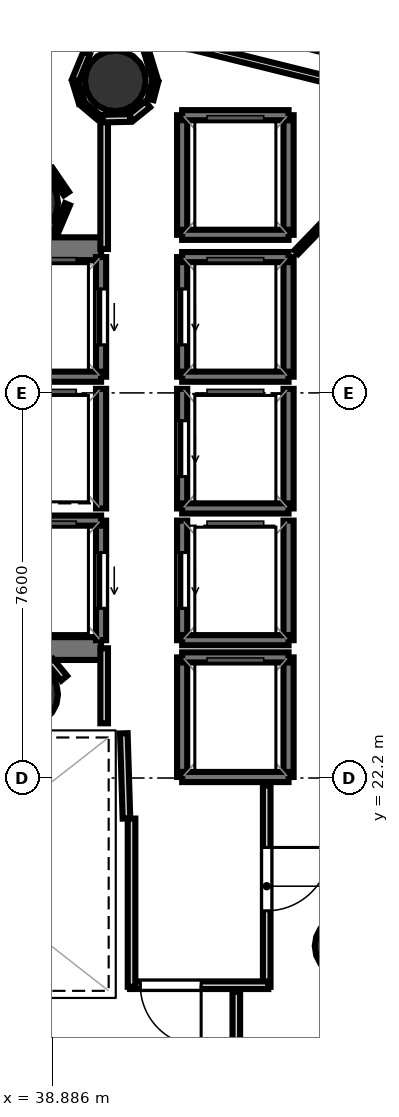
"""IFC4 building model, lengths in metres.
Left out: names, types, materials, properties, quantities, classifications, styles, units other than length and angle.
Written with IfcOpenShell. Run it as: python <this file> out.ifc"""

import sys

from ifc_helpers import new_model, si_unit, direction, frame, frame_2d, origin, origin_2d, place, context, subcontext, project, spatial, rectangle, hollow_circle, extrude, element, fill, save


model = new_model("IFC4")
c1 = context("Model", 3, precision=1e-05, world=origin(), true_north=direction((0.0, 1.0)))
c2 = subcontext(c1, "Body", "Model", "MODEL_VIEW")
j1 = project(units=[si_unit("LENGTHUNIT", "METRE"), si_unit("PLANEANGLEUNIT", "RADIAN")], contexts=[c1])
p1 = place(None, origin())
s1 = spatial("IfcSite", under=j1, at=p1, CompositionType="ELEMENT")
p2 = place(p1, origin())
s2 = spatial("IfcBuilding", under=s1, at=p2, CompositionType="ELEMENT")
p3 = place(p2, frame((0.0, 0.0, 192.9)))
s3 = spatial("IfcBuildingStorey", under=s2, at=p3, CompositionType="ELEMENT", Elevation=192.9)
p4 = place(p3, frame((29.33, 32.645, 0.0), z_axis=(0.0, 0.0, 1.0), x_axis=(1.0, 0.0, 0.0)))
e1 = element("IfcWall", 1, at=p4, inside=s3, PredefinedType="SHEAR", context=c2, shape_type="SweptSolid", body=[
    extrude(rectangle(XDim=10.52, YDim=0.45, at=frame_2d((5.26, 0.0))), origin(), (0.0, 0.0, 1.0), 3.52),
])
p5 = place(p4, frame((0.895, 0.0, 0.0)))
e2 = element("IfcOpeningElement", 2, at=p5, cuts=e1, PredefinedType="OPENING", context=c2, shape_type="SweptSolid", body=[
    extrude(rectangle(XDim=1.25, YDim=2.15, at=frame_2d((0.625, 1.075))), frame((0.0, 0.235, 0.0), z_axis=(0.0, -1.0, 0.0), x_axis=(1.0, 0.0, 0.0)), (0.0, 0.0, 1.0), 0.47),
])
p6 = place(p3, frame((29.33, 24.755, 0.0), z_axis=(0.0, 0.0, 1.0), x_axis=(1.0, 0.0, 0.0)))
e3 = element("IfcWall", 3, at=p6, inside=s3, PredefinedType="SHEAR", context=c2, shape_type="SweptSolid", body=[
    extrude(rectangle(XDim=10.52, YDim=0.45, at=frame_2d((5.26, 0.0))), origin(), (0.0, 0.0, 1.0), 3.52),
])
p7 = place(p6, frame((0.695, 0.0, 0.0)))
e4 = element("IfcOpeningElement", 4, at=p7, cuts=e3, PredefinedType="OPENING", context=c2, shape_type="SweptSolid", body=[
    extrude(rectangle(XDim=1.25, YDim=2.15, at=frame_2d((0.625, 1.075))), frame((0.0, 0.235, 0.0), z_axis=(0.0, -1.0, 0.0), x_axis=(1.0, 0.0, 0.0)), (0.0, 0.0, 1.0), 0.47),
])
for number, where, z_axis, x_axis in (
    (5, (38.4, 33.55, 0.0), (0.0, 0.0, 1.0), (1.0, 0.0, 0.0)),
    (6, (38.4, 23.85, 0.0), (0.0, 0.0, 1.0), (1.0, 0.0, 0.0)),
    (7, (40.131, 35.958, 0.0), (0.0, 0.0, 1.0), (1.0, 0.0, 0.0)),
    (8, (44.667, 18.883, 0.0), (0.0, 0.0, 1.0), (1.0, 0.0, 0.0)),
):
    element("IfcColumn", number, at=place(p3, frame(where, z_axis=z_axis, x_axis=x_axis)), inside=s3, PredefinedType="COLUMN", context=c2, shape_type="SweptSolid", body=[
        extrude(hollow_circle(Radius=0.6, WallThickness=0.03, at=origin_2d()), origin(), (0.0, 0.0, 1.0), 3.7),
    ])
p8 = place(p3, frame((39.85, 30.12, 0.0), z_axis=(0.0, 0.0, 1.0), x_axis=(0.0, 1.0, 0.0)))
e9 = element("IfcWall", 9, at=p8, inside=s3, PredefinedType="SOLIDWALL", context=c2, shape_type="SweptSolid", body=[
    extrude(rectangle(XDim=2.36, YDim=0.2, at=frame_2d((1.18, 0.0))), origin(), (0.0, 0.0, 1.0), 3.52),
])
p9 = place(p8, frame((0.63, 0.0, 0.0)))
e10 = element("IfcOpeningElement", 10, at=p9, cuts=e9, PredefinedType="OPENING", context=c2, shape_type="SweptSolid", body=[
    extrude(rectangle(XDim=1.1, YDim=2.15, at=frame_2d((0.55, 1.075))), frame((0.0, 0.11, 0.0), z_axis=(0.0, -1.0, 0.0), x_axis=(1.0, 0.0, 0.0)), (0.0, 0.0, 1.0), 0.22),
])
p10 = place(p3, frame((37.75, 30.12, 0.0), z_axis=(0.0, 0.0, 1.0), x_axis=(1.0, 0.0, 0.0)))
e11 = element("IfcWall", 11, at=p10, inside=s3, PredefinedType="SOLIDWALL", context=c2, shape_type="SweptSolid", body=[
    extrude(rectangle(XDim=2.1, YDim=0.2, at=frame_2d((1.05, 0.0))), origin(), (0.0, 0.0, 1.0), 3.52),
])
p11 = place(p3, frame((39.85, 24.92, 0.0), z_axis=(0.0, 0.0, 1.0), x_axis=(0.0, 1.0, 0.0)))
e12 = element("IfcWall", 12, at=p11, inside=s3, PredefinedType="SOLIDWALL", context=c2, shape_type="SweptSolid", body=[
    extrude(rectangle(XDim=2.36, YDim=0.2, at=frame_2d((1.18, 0.0))), origin(), (0.0, 0.0, 1.0), 3.52),
])
p12 = place(p11, frame((0.63, 0.0, 0.0)))
e13 = element("IfcOpeningElement", 13, at=p12, cuts=e12, PredefinedType="OPENING", context=c2, shape_type="SweptSolid", body=[
    extrude(rectangle(XDim=1.1, YDim=2.15, at=frame_2d((0.55, 1.075))), frame((0.0, 0.11, 0.0), z_axis=(0.0, -1.0, 0.0), x_axis=(1.0, 0.0, 0.0)), (0.0, 0.0, 1.0), 0.22),
])
p13 = place(p3, frame((37.75, 27.28, 0.0), z_axis=(0.0, 0.0, 1.0), x_axis=(1.0, 0.0, 0.0)))
e14 = element("IfcWall", 14, at=p13, inside=s3, PredefinedType="SOLIDWALL", context=c2, shape_type="SweptSolid", body=[
    extrude(rectangle(XDim=2.1, YDim=0.2, at=frame_2d((1.05, 0.0))), origin(), (0.0, 0.0, 1.0), 3.52),
])
p14 = place(p3, frame((43.55, 30.12, 0.0), z_axis=(0.0, 0.0, 1.0), x_axis=(0.0, 1.0, 0.0)))
e15 = element("IfcWall", 15, at=p14, inside=s3, PredefinedType="SOLIDWALL", context=c2, shape_type="SweptSolid", body=[
    extrude(rectangle(XDim=2.36, YDim=0.2, at=frame_2d((1.18, 0.0))), origin(), (0.0, 0.0, 1.0), 3.52),
])
p15 = place(p3, frame((41.45, 30.12, 0.0), z_axis=(0.0, 0.0, 1.0), x_axis=(0.0, 1.0, 0.0)))
e16 = element("IfcWall", 16, at=p15, inside=s3, PredefinedType="SOLIDWALL", context=c2, shape_type="SweptSolid", body=[
    extrude(rectangle(XDim=2.36, YDim=0.2, at=frame_2d((1.18, 0.0))), origin(), (0.0, 0.0, 1.0), 3.52),
])
p16 = place(p15, frame((0.63, 0.0, 0.0)))
e17 = element("IfcOpeningElement", 17, at=p16, cuts=e16, PredefinedType="OPENING", context=c2, shape_type="SweptSolid", body=[
    extrude(rectangle(XDim=1.1, YDim=2.15, at=frame_2d((0.55, 1.075))), frame((0.0, 0.11, 0.0), z_axis=(0.0, -1.0, 0.0), x_axis=(1.0, 0.0, 0.0)), (0.0, 0.0, 1.0), 0.22),
])
for number, where, z_axis, x_axis in (
    (18, (41.45, 32.48, 0.0), (0.0, 0.0, 1.0), (1.0, 0.0, 0.0)),
    (19, (41.45, 30.12, 0.0), (0.0, 0.0, 1.0), (1.0, 0.0, 0.0)),
):
    element("IfcWall", number, at=place(p3, frame(where, z_axis=z_axis, x_axis=x_axis)), inside=s3, PredefinedType="SOLIDWALL", context=c2, shape_type="SweptSolid", body=[
        extrude(rectangle(XDim=2.1, YDim=0.2, at=frame_2d((1.05, 0.0))), origin(), (0.0, 0.0, 1.0), 3.52),
    ])
p17 = place(p3, frame((43.55, 27.52, 0.0), z_axis=(0.0, 0.0, 1.0), x_axis=(0.0, 1.0, 0.0)))
e20 = element("IfcWall", 20, at=p17, inside=s3, PredefinedType="SOLIDWALL", context=c2, shape_type="SweptSolid", body=[
    extrude(rectangle(XDim=2.36, YDim=0.2, at=frame_2d((1.18, 0.0))), origin(), (0.0, 0.0, 1.0), 3.52),
])
p18 = place(p3, frame((41.45, 27.52, 0.0), z_axis=(0.0, 0.0, 1.0), x_axis=(0.0, 1.0, 0.0)))
e21 = element("IfcWall", 21, at=p18, inside=s3, PredefinedType="SOLIDWALL", context=c2, shape_type="SweptSolid", body=[
    extrude(rectangle(XDim=2.36, YDim=0.2, at=frame_2d((1.18, 0.0))), origin(), (0.0, 0.0, 1.0), 3.52),
])
p19 = place(p18, frame((0.63, 0.0, 0.0)))
e22 = element("IfcOpeningElement", 22, at=p19, cuts=e21, PredefinedType="OPENING", context=c2, shape_type="SweptSolid", body=[
    extrude(rectangle(XDim=1.1, YDim=2.15, at=frame_2d((0.55, 1.075))), frame((0.0, 0.11, 0.0), z_axis=(0.0, -1.0, 0.0), x_axis=(1.0, 0.0, 0.0)), (0.0, 0.0, 1.0), 0.22),
])
p20 = place(p3, frame((41.45, 27.52, 0.0), z_axis=(0.0, 0.0, 1.0), x_axis=(1.0, 0.0, 0.0)))
e23 = element("IfcWall", 23, at=p20, inside=s3, PredefinedType="SOLIDWALL", context=c2, shape_type="SweptSolid", body=[
    extrude(rectangle(XDim=2.1, YDim=0.2, at=frame_2d((1.05, 0.0))), origin(), (0.0, 0.0, 1.0), 3.52),
])
p21 = place(p3, frame((43.55, 24.92, 0.0), z_axis=(0.0, 0.0, 1.0), x_axis=(0.0, 1.0, 0.0)))
e24 = element("IfcWall", 24, at=p21, inside=s3, PredefinedType="SOLIDWALL", context=c2, shape_type="SweptSolid", body=[
    extrude(rectangle(XDim=2.36, YDim=0.2, at=frame_2d((1.18, 0.0))), origin(), (0.0, 0.0, 1.0), 3.52),
])
p22 = place(p3, frame((41.45, 24.92, 0.0), z_axis=(0.0, 0.0, 1.0), x_axis=(0.0, 1.0, 0.0)))
e25 = element("IfcWall", 25, at=p22, inside=s3, PredefinedType="SOLIDWALL", context=c2, shape_type="SweptSolid", body=[
    extrude(rectangle(XDim=2.36, YDim=0.2, at=frame_2d((1.18, 0.0))), origin(), (0.0, 0.0, 1.0), 3.52),
])
p23 = place(p22, frame((0.63, 0.0, 0.0)))
e26 = element("IfcOpeningElement", 26, at=p23, cuts=e25, PredefinedType="OPENING", context=c2, shape_type="SweptSolid", body=[
    extrude(rectangle(XDim=1.1, YDim=2.15, at=frame_2d((0.55, 1.075))), frame((0.0, 0.11, 0.0), z_axis=(0.0, -1.0, 0.0), x_axis=(1.0, 0.0, 0.0)), (0.0, 0.0, 1.0), 0.22),
])
p24 = place(p3, frame((41.45, 24.92, 0.0), z_axis=(0.0, 0.0, 1.0), x_axis=(1.0, 0.0, 0.0)))
e27 = element("IfcWall", 27, at=p24, inside=s3, PredefinedType="SOLIDWALL", context=c2, shape_type="SweptSolid", body=[
    extrude(rectangle(XDim=2.1, YDim=0.2, at=frame_2d((1.05, 0.0))), origin(), (0.0, 0.0, 1.0), 3.52),
])
p25 = place(p3, frame((39.85, 27.52, 0.0), z_axis=(0.0, 0.0, 1.0), x_axis=(0.0, 1.0, 0.0)))
e28 = element("IfcWall", 28, at=p25, inside=s3, PredefinedType="SOLIDWALL", context=c2, shape_type="SweptSolid", body=[
    extrude(rectangle(XDim=2.36, YDim=0.2, at=frame_2d((1.18, 0.0))), origin(), (0.0, 0.0, 1.0), 3.52),
])
for number, where, z_axis, x_axis in (
    (29, (43.55, 22.22, 0.0), (0.0, 0.0, 1.0), (0.0, 1.0, 0.0)),
    (30, (41.45, 22.22, 0.0), (0.0, 0.0, 1.0), (0.0, 1.0, 0.0)),
):
    element("IfcWall", number, at=place(p3, frame(where, z_axis=z_axis, x_axis=x_axis)), inside=s3, PredefinedType="SOLIDWALL", context=c2, shape_type="SweptSolid", body=[
        extrude(rectangle(XDim=2.36, YDim=0.2, at=frame_2d((1.18, 0.0))), origin(), (0.0, 0.0, 1.0), 3.52),
    ])
for number, where, z_axis, x_axis in (
    (31, (41.45, 24.58, 0.0), (0.0, 0.0, 1.0), (1.0, 0.0, 0.0)),
    (32, (41.45, 22.22, 0.0), (0.0, 0.0, 1.0), (1.0, 0.0, 0.0)),
):
    element("IfcWall", number, at=place(p3, frame(where, z_axis=z_axis, x_axis=x_axis)), inside=s3, PredefinedType="SOLIDWALL", context=c2, shape_type="SweptSolid", body=[
        extrude(rectangle(XDim=2.1, YDim=0.2, at=frame_2d((1.05, 0.0))), origin(), (0.0, 0.0, 1.0), 3.52),
    ])
for number, where, z_axis, x_axis in (
    (33, (43.55, 32.92, 0.0), (0.0, 0.0, 1.0), (0.0, 1.0, 0.0)),
    (34, (41.45, 32.92, 0.0), (0.0, 0.0, 1.0), (0.0, 1.0, 0.0)),
):
    element("IfcWall", number, at=place(p3, frame(where, z_axis=z_axis, x_axis=x_axis)), inside=s3, PredefinedType="SOLIDWALL", context=c2, shape_type="SweptSolid", body=[
        extrude(rectangle(XDim=2.36, YDim=0.2, at=frame_2d((1.18, 0.0))), origin(), (0.0, 0.0, 1.0), 3.52),
    ])
for number, where, z_axis, x_axis in (
    (35, (41.45, 35.28, 0.0), (0.0, 0.0, 1.0), (1.0, 0.0, 0.0)),
    (36, (41.45, 32.92, 0.0), (0.0, 0.0, 1.0), (1.0, 0.0, 0.0)),
):
    element("IfcWall", number, at=place(p3, frame(where, z_axis=z_axis, x_axis=x_axis)), inside=s3, PredefinedType="SOLIDWALL", context=c2, shape_type="SweptSolid", body=[
        extrude(rectangle(XDim=2.1, YDim=0.2, at=frame_2d((1.05, 0.0))), origin(), (0.0, 0.0, 1.0), 3.52),
    ])
p26 = place(p3, frame((40.351, 21.401, 0.0), z_axis=(0.0, 0.0, 1.0), x_axis=(-0.031058045979, 0.999517582527, 0.0)))
e37 = element("IfcWall", 37, at=p26, inside=s3, PredefinedType="PARTITIONING", context=c2, shape_type="SweptSolid", body=[
    extrude(rectangle(XDim=1.682, YDim=0.15, at=frame_2d((0.841, 0.0))), origin(), (0.0, 0.0, 1.0), 2.84),
])
p27 = place(p3, frame((39.911, 23.28, 0.0), z_axis=(0.0, 0.0, 1.0), x_axis=(0.0, 1.0, 0.0)))
e38 = element("IfcWall", 38, at=p27, inside=s3, PredefinedType="PARTITIONING", context=c2, shape_type="SweptSolid", body=[
    extrude(rectangle(XDim=1.48, YDim=0.15, at=frame_2d((0.74, 0.0))), origin(), (0.0, 0.0, 1.0), 2.84),
])
p28 = place(p3, frame((39.911, 32.64, 0.0), z_axis=(0.0, 0.0, 1.0), x_axis=(0.0, 1.0, 0.0)))
e39 = element("IfcWall", 39, at=p28, inside=s3, PredefinedType="PARTITIONING", context=c2, shape_type="SweptSolid", body=[
    extrude(rectangle(XDim=2.604, YDim=0.15, at=frame_2d((1.302, 0.0))), origin(), (0.0, 0.0, 1.0), 2.84),
])
p29 = place(p3, frame((39.881, 35.213, 0.0), z_axis=(0.0, 0.0, 1.0), x_axis=(0.999756500784, 0.02206669754, 0.0)))
e40 = element("IfcWall", 40, at=p29, inside=s3, PredefinedType="PARTITIONING", context=c2, shape_type="SweptSolid", body=[
    extrude(rectangle(XDim=0.542, YDim=0.15, at=frame_2d((0.271, 0.0))), origin(), (0.0, 0.0, 1.0), 2.84),
])
p30 = place(p3, frame((40.441, 35.232, 0.0), z_axis=(0.0, 0.0, 1.0), x_axis=(0.778714564707, 0.627378376033, 0.0)))
e41 = element("IfcWall", 41, at=p30, inside=s3, PredefinedType="PARTITIONING", context=c2, shape_type="SweptSolid", body=[
    extrude(rectangle(XDim=0.421, YDim=0.15, at=frame_2d((0.21, 0.0))), origin(), (0.0, 0.0, 1.0), 2.84),
])
p31 = place(p3, frame((43.119, 22.05, 0.0), z_axis=(0.0, 0.0, 1.0), x_axis=(0.0, -1.0, 0.0)))
e42 = element("IfcWall", 42, at=p31, inside=s3, PredefinedType="PARTITIONING", context=c2, shape_type="SweptSolid", body=[
    extrude(rectangle(XDim=3.97, YDim=0.15, at=frame_2d((1.985, 0.0))), origin(), (0.0, 0.0, 1.0), 2.84),
])
p32 = place(p31, frame((1.22, 0.0, 0.0)))
e43 = element("IfcOpeningElement", 43, at=p32, cuts=e42, PredefinedType="OPENING", context=c2, shape_type="SweptSolid", body=[
    extrude(rectangle(XDim=1.25, YDim=2.2, at=frame_2d((0.625, 1.1))), frame((0.0, 0.085, 0.0), z_axis=(0.0, -1.0, 0.0), x_axis=(1.0, 0.0, 0.0)), (0.0, 0.0, 1.0), 0.17),
])
p33 = place(p3, frame((43.15, 18.111, 0.0), z_axis=(0.0, 0.0, 1.0), x_axis=(-1.0, 0.0, 0.0)))
e44 = element("IfcWall", 44, at=p33, inside=s3, PredefinedType="PARTITIONING", context=c2, shape_type="SweptSolid", body=[
    extrude(rectangle(XDim=2.73, YDim=0.15, at=frame_2d((1.365, 0.0))), origin(), (0.0, 0.0, 1.0), 2.84),
])
p34 = place(p33, frame((1.325, 0.0, 0.0)))
e45 = element("IfcOpeningElement", 45, at=p34, cuts=e44, PredefinedType="OPENING", context=c2, shape_type="SweptSolid", body=[
    extrude(rectangle(XDim=1.2, YDim=2.15, at=frame_2d((0.6, 1.075))), frame((0.0, 0.085, 0.0), z_axis=(0.0, -1.0, 0.0), x_axis=(1.0, 0.0, 0.0)), (0.0, 0.0, 1.0), 0.17),
])
p35 = place(p3, frame((40.451, 18.08, 0.0), z_axis=(0.0, 0.0, 1.0), x_axis=(0.0, 1.0, 0.0)))
e46 = element("IfcWall", 46, at=p35, inside=s3, PredefinedType="PARTITIONING", context=c2, shape_type="SweptSolid", body=[
    extrude(rectangle(XDim=3.32, YDim=0.15, at=frame_2d((1.66, 0.0))), origin(), (0.0, 0.0, 1.0), 2.84),
])
p36 = place(p3, frame((39.121, 24.17, 0.0), z_axis=(0.0, 0.0, 1.0), x_axis=(-0.638008265708, 0.770029514296, 0.0)))
e47 = element("IfcWall", 47, at=p36, inside=s3, PredefinedType="PARTITIONING", context=c2, shape_type="SweptSolid", body=[
    extrude(rectangle(XDim=0.431, YDim=0.15, at=frame_2d((0.215, 0.0))), origin(), (0.0, 0.0, 1.0), 2.84),
])
p37 = place(p3, frame((42.519, 17.98, 0.0), z_axis=(0.0, 0.0, 1.0), x_axis=(0.0, -1.0, 0.0)))
e48 = element("IfcWall", 48, at=p37, inside=s3, PredefinedType="PARTITIONING", context=c2, shape_type="SweptSolid", body=[
    extrude(rectangle(XDim=2.977, YDim=0.15, at=frame_2d((1.488, 0.0))), origin(), (0.0, 0.0, 1.0), 2.84),
])
p38 = place(p3, frame((43.702, 32.576, 0.0), z_axis=(0.0, 0.0, 1.0), x_axis=(0.694641433789, 0.719356155506, 0.0)))
e49 = element("IfcWall", 49, at=p38, inside=s3, PredefinedType="PARTITIONING", context=c2, shape_type="SweptSolid", body=[
    extrude(rectangle(XDim=4.643, YDim=0.105, at=frame_2d((2.321, 0.0))), origin(), (0.0, 0.0, 1.0), 2.84),
])
p39 = place(p38, frame((1.976, 0.0, 0.0)))
e50 = element("IfcOpeningElement", 50, at=p39, cuts=e49, PredefinedType="OPENING", context=c2, shape_type="SweptSolid", body=[
    extrude(rectangle(XDim=1.25, YDim=2.2, at=frame_2d((0.625, 1.1))), frame((0.0, 0.062, 0.0), z_axis=(0.0, -1.0, 0.0), x_axis=(1.0, 0.0, 0.0)), (0.0, 0.0, 1.0), 0.125),
])
p40 = place(p3, frame((40.827, 35.592, 0.0), z_axis=(0.0, 0.0, 1.0), x_axis=(0.253227150491, 0.96740684836, 0.0)))
e51 = element("IfcWall", 51, at=p40, inside=s3, PredefinedType="PARTITIONING", context=c2, shape_type="SweptSolid", body=[
    extrude(rectangle(XDim=0.37, YDim=0.12, at=frame_2d((0.185, 0.0))), origin(), (0.0, 0.0, 1.0), 2.84),
])
p41 = place(p3, frame((40.921, 35.967, 0.0), z_axis=(0.0, 0.0, 1.0), x_axis=(-0.290302714428, 0.95693486403, 0.0)))
e52 = element("IfcWall", 52, at=p41, inside=s3, PredefinedType="PARTITIONING", context=c2, shape_type="SweptSolid", body=[
    extrude(rectangle(XDim=1.629, YDim=0.105, at=frame_2d((0.814, 0.0))), origin(), (0.0, 0.0, 1.0), 2.84),
])
p42 = place(p3, frame((39.565, 36.507, 0.0), z_axis=(0.0, 0.0, 1.0), x_axis=(-0.382796622927, -0.923832639322, 0.0)))
e53 = element("IfcWall", 53, at=p42, inside=s3, PredefinedType="PARTITIONING", context=c2, shape_type="SweptSolid", body=[
    extrude(rectangle(XDim=0.582, YDim=0.14, at=frame_2d((0.291, 0.0))), origin(), (0.0, 0.0, 1.0), 2.84),
])
p43 = place(p3, frame((39.341, 35.949, 0.0), z_axis=(0.0, 0.0, 1.0), x_axis=(0.290544943199, -0.956861346268, 0.0)))
e54 = element("IfcWall", 54, at=p43, inside=s3, PredefinedType="PARTITIONING", context=c2, shape_type="SweptSolid", body=[
    extrude(rectangle(XDim=0.441, YDim=0.12, at=frame_2d((0.221, 0.0))), origin(), (0.0, 0.0, 1.0), 2.84),
])
p44 = place(p3, frame((39.479, 35.512, 0.0), z_axis=(0.0, 0.0, 1.0), x_axis=(0.763588477055, -0.645703211784, 0.0)))
e55 = element("IfcWall", 55, at=p44, inside=s3, PredefinedType="PARTITIONING", context=c2, shape_type="SweptSolid", body=[
    extrude(rectangle(XDim=0.412, YDim=0.105, at=frame_2d((0.206, 0.0))), origin(), (0.0, 0.0, 1.0), 2.84),
])
p45 = place(p3, frame((39.166, 33.733, 0.0), z_axis=(0.0, 0.0, 1.0), x_axis=(-0.563162199293, 0.826346378517, 0.0)))
e56 = element("IfcWall", 56, at=p45, inside=s3, PredefinedType="PARTITIONING", context=c2, shape_type="SweptSolid", body=[
    extrude(rectangle(XDim=0.564, YDim=0.12, at=frame_2d((0.282, 0.0))), origin(), (0.0, 0.0, 1.0), 2.84),
])
p46 = place(p3, frame((38.645, 32.858, 0.0), z_axis=(0.0, 0.0, 1.0), x_axis=(0.923908393326, 0.382613748761, 0.0)))
e57 = element("IfcWall", 57, at=p46, inside=s3, PredefinedType="PARTITIONING", context=c2, shape_type="SweptSolid", body=[
    extrude(rectangle(XDim=0.329, YDim=0.12, at=frame_2d((0.165, 0.0))), origin(), (0.0, 0.0, 1.0), 2.84),
])
p47 = place(p3, frame((38.966, 33.0, 0.0), z_axis=(0.0, 0.0, 1.0), x_axis=(0.389247517771, 0.921133198788, 0.0)))
e58 = element("IfcWall", 58, at=p47, inside=s3, PredefinedType="PARTITIONING", context=c2, shape_type="SweptSolid", body=[
    extrude(rectangle(XDim=0.568, YDim=0.105, at=frame_2d((0.284, 0.0))), origin(), (0.0, 0.0, 1.0), 2.84),
])
p48 = place(p3, frame((37.222, 37.742, 0.0), z_axis=(0.0, 0.0, 1.0), x_axis=(0.97049288978, -0.241129738703, 0.0)))
e59 = element("IfcWall", 59, at=p48, inside=s3, PredefinedType="PARTITIONING", context=c2, shape_type="SweptSolid", body=[
    extrude(rectangle(XDim=9.44, YDim=0.14, at=frame_2d((4.72, 0.0))), origin(), (0.0, 0.0, 1.0), 2.84),
])
p49 = place(p9, origin())
e60 = element("IfcDoor", 60, at=p49, inside=s3, OperationType="SLIDING_TO_LEFT", PredefinedType="DOOR", context=c2, shape_type="SweptSolid", body=[
    extrude(rectangle(XDim=1.1, YDim=2.15, at=frame_2d((0.55, 1.075))), frame((0.0, 0.025, 0.0), z_axis=(0.0, -1.0, 0.0), x_axis=(1.0, 0.0, 0.0)), (0.0, 0.0, 1.0), 0.05),
])
fill(e10, e60)
p50 = place(p12, origin())
e61 = element("IfcDoor", 61, at=p50, inside=s3, OperationType="SLIDING_TO_LEFT", PredefinedType="DOOR", context=c2, shape_type="SweptSolid", body=[
    extrude(rectangle(XDim=1.1, YDim=2.15, at=frame_2d((0.55, 1.075))), frame((0.0, 0.025, 0.0), z_axis=(0.0, -1.0, 0.0), x_axis=(1.0, 0.0, 0.0)), (0.0, 0.0, 1.0), 0.05),
])
fill(e13, e61)
p51 = place(p16, origin())
e62 = element("IfcDoor", 62, at=p51, inside=s3, OperationType="SLIDING_TO_LEFT", PredefinedType="DOOR", context=c2, shape_type="SweptSolid", body=[
    extrude(rectangle(XDim=1.1, YDim=2.15, at=frame_2d((0.55, 1.075))), frame((0.0, 0.025, 0.0), z_axis=(0.0, -1.0, 0.0), x_axis=(1.0, 0.0, 0.0)), (0.0, 0.0, 1.0), 0.05),
])
fill(e17, e62)
p52 = place(p19, origin())
e63 = element("IfcDoor", 63, at=p52, inside=s3, OperationType="SLIDING_TO_LEFT", PredefinedType="DOOR", context=c2, shape_type="SweptSolid", body=[
    extrude(rectangle(XDim=1.1, YDim=2.15, at=frame_2d((0.55, 1.075))), frame((0.0, 0.025, 0.0), z_axis=(0.0, -1.0, 0.0), x_axis=(1.0, 0.0, 0.0)), (0.0, 0.0, 1.0), 0.05),
])
fill(e22, e63)
p53 = place(p23, origin())
e64 = element("IfcDoor", 64, at=p53, inside=s3, OperationType="SLIDING_TO_LEFT", PredefinedType="DOOR", context=c2, shape_type="SweptSolid", body=[
    extrude(rectangle(XDim=1.1, YDim=2.15, at=frame_2d((0.55, 1.075))), frame((0.0, 0.025, 0.0), z_axis=(0.0, -1.0, 0.0), x_axis=(1.0, 0.0, 0.0)), (0.0, 0.0, 1.0), 0.05),
])
fill(e26, e64)
p54 = place(p34, origin())
e65 = element("IfcDoor", 65, at=p54, inside=s3, OperationType="SINGLE_SWING_LEFT", PredefinedType="DOOR", context=c2, shape_type="SweptSolid", body=[
    extrude(rectangle(XDim=1.2, YDim=2.15, at=frame_2d((0.6, 1.075))), frame((0.0, 0.025, 0.0), z_axis=(0.0, -1.0, 0.0), x_axis=(1.0, 0.0, 0.0)), (0.0, 0.0, 1.0), 0.05),
])
fill(e45, e65)
p55 = place(p32, origin())
e66 = element("IfcDoor", 66, at=p55, inside=s3, OperationType="SINGLE_SWING_LEFT", PredefinedType="DOOR", context=c2, shape_type="SweptSolid", body=[
    extrude(rectangle(XDim=1.25, YDim=2.2, at=frame_2d((0.625, 1.1))), frame((0.0, 0.025, 0.0), z_axis=(0.0, -1.0, 0.0), x_axis=(1.0, 0.0, 0.0)), (0.0, 0.0, 1.0), 0.05),
])
fill(e43, e66)
save(model, sys.argv[1])
